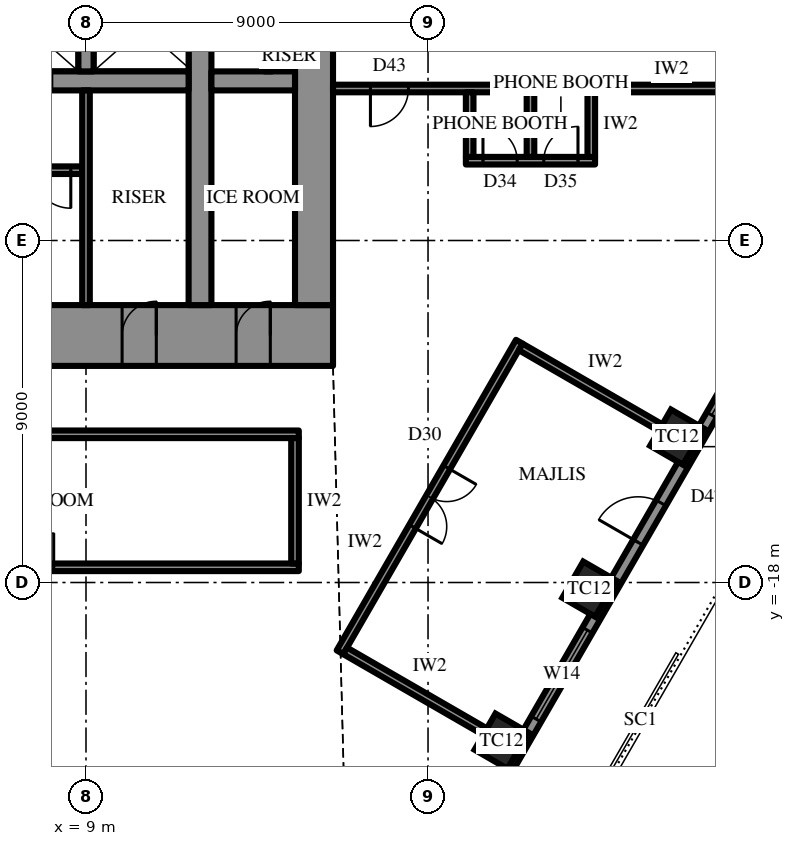
"""IFC4 building model, lengths in metres.
Left out: names, types, materials, properties, quantities, classifications, styles, units other than length and angle.
Written with IfcOpenShell. Run it as: python <this file> out.ifc"""

import sys

from ifc_helpers import new_model, si_unit, direction, frame, frame_2d, origin, origin_2d, place, context, subcontext, project, spatial, rectangle, extrude, element, fill, save


model = new_model("IFC4")
c1 = context("Model", 3, precision=1e-05, world=origin(), true_north=direction((0.0, 1.0)))
c2 = subcontext(c1, "Body", "Model", "MODEL_VIEW")
j1 = project(units=[si_unit("LENGTHUNIT", "METRE"), si_unit("PLANEANGLEUNIT", "RADIAN")], contexts=[c1])
p1 = place(None, origin())
s1 = spatial("IfcSite", under=j1, at=p1, CompositionType="ELEMENT")
p2 = place(p1, origin())
s2 = spatial("IfcBuilding", under=s1, at=p2, CompositionType="ELEMENT")
p3 = place(p2, frame((0.0, 0.0, 286.9)))
s3 = spatial("IfcBuildingStorey", under=s2, at=p3, CompositionType="ELEMENT", Elevation=286.9)
for number, where, z_axis, x_axis in (
    (1, (19.933, -22.175, 0.0), (0.0, 0.0, 1.0), (0.5, 0.866, 0.0)),
    (2, (22.242, -18.175, 0.0), (0.0, 0.0, 1.0), (0.5, 0.866, 0.0)),
    (3, (24.552, -14.175, 0.0), (0.0, 0.0, 1.0), (0.5, 0.866, 0.0)),
):
    element("IfcColumn", number, at=place(p3, frame(where, z_axis=z_axis, x_axis=x_axis)), inside=s3, PredefinedType="COLUMN", context=c2, shape_type="SweptSolid", body=[
        extrude(rectangle(XDim=1.1, YDim=1.0, at=origin_2d()), origin(), (0.0, 0.0, 1.0), 4.2),
    ])
p4 = place(p3, frame((15.5, -11.5, 0.0), z_axis=(0.0, 0.0, 1.0), x_axis=(-1.0, 0.0, 0.0)))
e4 = element("IfcWall", 4, at=p4, inside=s3, PredefinedType="SHEAR", context=c2, shape_type="SweptSolid", body=[
    extrude(rectangle(XDim=31.0, YDim=1.6, at=frame_2d((15.5, 0.0))), origin(), (0.0, 0.0, 1.0), 4.2),
])
p5 = place(p4, frame((16.35, 0.0, 0.0)))
e5 = element("IfcOpeningElement", 5, at=p5, cuts=e4, PredefinedType="OPENING", context=c2, shape_type="SweptSolid", body=[
    extrude(rectangle(XDim=0.9, YDim=2.2, at=frame_2d((0.45, 1.1))), frame((0.0, 0.81, 0.0), z_axis=(0.0, -1.0, 0.0), x_axis=(1.0, 0.0, 0.0)), (0.0, 0.0, 1.0), 1.62),
])
p6 = place(p4, frame((19.35, 0.0, 0.0)))
e6 = element("IfcOpeningElement", 6, at=p6, cuts=e4, PredefinedType="OPENING", context=c2, shape_type="SweptSolid", body=[
    extrude(rectangle(XDim=0.9, YDim=2.2, at=frame_2d((0.45, 1.1))), frame((0.0, 0.81, 0.0), z_axis=(0.0, -1.0, 0.0), x_axis=(1.0, 0.0, 0.0)), (0.0, 0.0, 1.0), 1.62),
])
p7 = place(p4, frame((22.4, 0.0, 0.0)))
e7 = element("IfcOpeningElement", 7, at=p7, cuts=e4, PredefinedType="OPENING", context=c2, shape_type="SweptSolid", body=[
    extrude(rectangle(XDim=1.0, YDim=2.2, at=frame_2d((0.5, 1.1))), frame((0.0, 0.81, 0.0), z_axis=(0.0, -1.0, 0.0), x_axis=(1.0, 0.0, 0.0)), (0.0, 0.0, 1.0), 1.62),
])
p8 = place(p4, frame((1.65, 0.0, 0.0)))
e8 = element("IfcOpeningElement", 8, at=p8, cuts=e4, PredefinedType="OPENING", context=c2, shape_type="SweptSolid", body=[
    extrude(rectangle(XDim=0.9, YDim=2.2, at=frame_2d((0.45, 1.1))), frame((0.0, 0.81, 0.0), z_axis=(0.0, -1.0, 0.0), x_axis=(1.0, 0.0, 0.0)), (0.0, 0.0, 1.0), 1.62),
])
p9 = place(p4, frame((4.65, 0.0, 0.0)))
e9 = element("IfcOpeningElement", 9, at=p9, cuts=e4, PredefinedType="OPENING", context=c2, shape_type="SweptSolid", body=[
    extrude(rectangle(XDim=0.9, YDim=2.2, at=frame_2d((0.45, 1.1))), frame((0.0, 0.81, 0.0), z_axis=(0.0, -1.0, 0.0), x_axis=(1.0, 0.0, 0.0)), (0.0, 0.0, 1.0), 1.62),
])
p10 = place(p4, frame((25.45, 0.0, 0.0)))
e10 = element("IfcOpeningElement", 10, at=p10, cuts=e4, PredefinedType="OPENING", context=c2, shape_type="SweptSolid", body=[
    extrude(rectangle(XDim=0.9, YDim=2.2, at=frame_2d((0.45, 1.1))), frame((0.0, 0.81, 0.0), z_axis=(0.0, -1.0, 0.0), x_axis=(1.0, 0.0, 0.0)), (0.0, 0.0, 1.0), 1.62),
])
p11 = place(p4, frame((28.45, 0.0, 0.0)))
e11 = element("IfcOpeningElement", 11, at=p11, cuts=e4, PredefinedType="OPENING", context=c2, shape_type="SweptSolid", body=[
    extrude(rectangle(XDim=0.9, YDim=2.2, at=frame_2d((0.45, 1.1))), frame((0.0, 0.81, 0.0), z_axis=(0.0, -1.0, 0.0), x_axis=(1.0, 0.0, 0.0)), (0.0, 0.0, 1.0), 1.62),
])
p12 = place(p3, frame((15.0, -10.7, 0.0), z_axis=(0.0, 0.0, 1.0), x_axis=(0.0, 1.0, 0.0)))
e12 = element("IfcWall", 12, at=p12, inside=s3, PredefinedType="SHEAR", context=c2, shape_type="SweptSolid", body=[
    extrude(rectangle(XDim=21.4, YDim=1.0, at=frame_2d((10.7, 0.0))), origin(), (0.0, 0.0, 1.0), 4.2),
])
p13 = place(p12, frame((9.8, 0.0, 0.0)))
e13 = element("IfcOpeningElement", 13, at=p13, cuts=e12, PredefinedType="OPENING", context=c2, shape_type="SweptSolid", body=[
    extrude(rectangle(XDim=1.8, YDim=2.4, at=frame_2d((0.9, 1.2))), frame((0.0, 0.51, 0.0), z_axis=(0.0, -1.0, 0.0), x_axis=(1.0, 0.0, 0.0)), (0.0, 0.0, 1.0), 1.02),
])
p14 = place(p3, frame((12.0, -10.7, 0.0), z_axis=(0.0, 0.0, 1.0), x_axis=(0.0, 1.0, 0.0)))
e14 = element("IfcWall", 14, at=p14, inside=s3, PredefinedType="SHEAR", context=c2, shape_type="SweptSolid", body=[
    extrude(rectangle(XDim=21.4, YDim=0.6, at=frame_2d((10.7, 0.0))), origin(), (0.0, 0.0, 1.0), 4.2),
])
p15 = place(p14, frame((9.8, 0.0, 0.0)))
e15 = element("IfcOpeningElement", 15, at=p15, cuts=e14, PredefinedType="OPENING", context=c2, shape_type="SweptSolid", body=[
    extrude(rectangle(XDim=1.8, YDim=2.4, at=frame_2d((0.9, 1.2))), frame((0.0, 0.31, 0.0), z_axis=(0.0, -1.0, 0.0), x_axis=(1.0, 0.0, 0.0)), (0.0, 0.0, 1.0), 0.62),
])
p16 = place(p3, frame((14.5, -4.8, 0.0), z_axis=(0.0, 0.0, 1.0), x_axis=(-1.0, 0.0, 0.0)))
e16 = element("IfcWall", 16, at=p16, inside=s3, PredefinedType="SHEAR", context=c2, shape_type="SweptSolid", body=[
    extrude(rectangle(XDim=2.2, YDim=0.5, at=frame_2d((1.1, 0.0))), origin(), (0.0, 0.0, 1.0), 4.2),
])
p17 = place(p3, frame((11.7, -4.8, 0.0), z_axis=(0.0, 0.0, 1.0), x_axis=(-1.0, 0.0, 0.0)))
e17 = element("IfcWall", 17, at=p17, inside=s3, PredefinedType="SHEAR", context=c2, shape_type="SweptSolid", body=[
    extrude(rectangle(XDim=23.4, YDim=0.5, at=frame_2d((11.7, 0.0))), origin(), (0.0, 0.0, 1.0), 4.2),
])
p18 = place(p17, frame((6.6, 0.0, 0.0)))
e18 = element("IfcOpeningElement", 18, at=p18, cuts=e17, PredefinedType="OPENING", context=c2, shape_type="SweptSolid", body=[
    extrude(rectangle(XDim=1.2, YDim=2.2, at=frame_2d((0.6, 1.1))), frame((0.0, 0.26, 0.0), z_axis=(0.0, -1.0, 0.0), x_axis=(1.0, 0.0, 0.0)), (0.0, 0.0, 1.0), 0.52),
])
p19 = place(p17, frame((3.6, 0.0, 0.0)))
e19 = element("IfcOpeningElement", 19, at=p19, cuts=e17, PredefinedType="OPENING", context=c2, shape_type="SweptSolid", body=[
    extrude(rectangle(XDim=1.2, YDim=2.2, at=frame_2d((0.6, 1.1))), frame((0.0, 0.26, 0.0), z_axis=(0.0, -1.0, 0.0), x_axis=(1.0, 0.0, 0.0)), (0.0, 0.0, 1.0), 0.52),
])
p20 = place(p3, frame((9.0, -2.25, 0.0), z_axis=(0.0, 0.0, 1.0), x_axis=(0.0, -1.0, 0.0)))
e20 = element("IfcWall", 20, at=p20, inside=s3, PredefinedType="SHEAR", context=c2, shape_type="SweptSolid", body=[
    extrude(rectangle(XDim=2.3, YDim=0.4, at=frame_2d((1.15, 0.0))), origin(), (0.0, 0.0, 1.0), 4.2),
])
p21 = place(p3, frame((8.9, -7.15, 0.0), z_axis=(0.0, 0.0, 1.0), x_axis=(-1.0, 0.0, 0.0)))
e21 = element("IfcWall", 21, at=p21, inside=s3, PredefinedType="SHEAR", context=c2, shape_type="SweptSolid", body=[
    extrude(rectangle(XDim=8.6, YDim=0.2, at=frame_2d((4.3, 0.0))), origin(), (0.0, 0.0, 1.0), 4.2),
])
p22 = place(p21, frame((0.3, 0.0, 0.0)))
e22 = element("IfcOpeningElement", 22, at=p22, cuts=e21, PredefinedType="OPENING", context=c2, shape_type="SweptSolid", body=[
    extrude(rectangle(XDim=1.0, YDim=2.2, at=frame_2d((0.5, 1.1))), frame((0.0, 0.11, 0.0), z_axis=(0.0, -1.0, 0.0), x_axis=(1.0, 0.0, 0.0)), (0.0, 0.0, 1.0), 0.22),
])
p23 = place(p3, frame((18.707, -25.299, 0.0), z_axis=(0.0, 0.0, 1.0), x_axis=(0.500000442367, 0.866025148383, 0.0)))
e23 = element("IfcWall", 23, at=p23, inside=s3, PredefinedType="SOLIDWALL", context=c2, shape_type="SweptSolid", body=[
    extrude(rectangle(XDim=25.113, YDim=0.3, at=frame_2d((12.556, 0.0))), origin(), (0.0, 0.0, 1.0), 2.8),
])
p24 = place(p23, frame((4.278, 0.0, 0.6)))
e24 = element("IfcOpeningElement", 24, at=p24, cuts=e23, PredefinedType="OPENING", context=c2, shape_type="SweptSolid", body=[
    extrude(rectangle(XDim=2.7, YDim=1.95, at=frame_2d((1.35, 0.975))), frame((0.0, 0.16, 0.0), z_axis=(0.0, -1.0, 0.0), x_axis=(1.0, 0.0, 0.0)), (0.0, 0.0, 1.0), 0.32),
])
p25 = place(p23, frame((9.647, 0.0, 0.0)))
e25 = element("IfcOpeningElement", 25, at=p25, cuts=e23, PredefinedType="OPENING", context=c2, shape_type="SweptSolid", body=[
    extrude(rectangle(XDim=1.2, YDim=2.4, at=frame_2d((0.6, 1.2))), frame((0.0, 0.16, 0.0), z_axis=(0.0, -1.0, 0.0), x_axis=(1.0, 0.0, 0.0)), (0.0, 0.0, 1.0), 0.32),
])
p26 = place(p23, frame((13.516, 0.0, 0.6)))
e26 = element("IfcOpeningElement", 26, at=p26, cuts=e23, PredefinedType="OPENING", context=c2, shape_type="SweptSolid", body=[
    extrude(rectangle(XDim=2.7, YDim=1.95, at=frame_2d((1.35, 0.975))), frame((0.0, 0.16, 0.0), z_axis=(0.0, -1.0, 0.0), x_axis=(1.0, 0.0, 0.0)), (0.0, 0.0, 1.0), 0.32),
])
p27 = place(p23, frame((18.135, 0.0, 0.6)))
e27 = element("IfcOpeningElement", 27, at=p27, cuts=e23, PredefinedType="OPENING", context=c2, shape_type="SweptSolid", body=[
    extrude(rectangle(XDim=2.7, YDim=1.95, at=frame_2d((1.35, 0.975))), frame((0.0, 0.16, 0.0), z_axis=(0.0, -1.0, 0.0), x_axis=(1.0, 0.0, 0.0)), (0.0, 0.0, 1.0), 0.32),
])
p28 = place(p3, frame((9.0, -5.05, 0.0), z_axis=(0.0, 0.0, 1.0), x_axis=(0.0, -1.0, 0.0)))
e28 = element("IfcWall", 28, at=p28, inside=s3, PredefinedType="PARTITIONING", context=c2, shape_type="SweptSolid", body=[
    extrude(rectangle(XDim=5.65, YDim=0.2, at=frame_2d((2.825, 0.0))), origin(), (0.0, 0.0, 1.0), 4.0),
])
p29 = place(p3, frame((13.8, -3.55, 0.0), z_axis=(0.0, 0.0, 1.0), x_axis=(0.0, -1.0, 0.0)))
e29 = element("IfcWall", 29, at=p29, inside=s3, PredefinedType="PARTITIONING", context=c2, shape_type="SweptSolid", body=[
    extrude(rectangle(XDim=1.0, YDim=0.2, at=frame_2d((0.5, 0.0))), origin(), (0.0, 0.0, 1.0), 4.0),
])
p30 = place(p3, frame((14.6, -14.1, 0.0), z_axis=(0.0, 0.0, 1.0), x_axis=(-1.0, 0.0, 0.0)))
e30 = element("IfcWall", 30, at=p30, inside=s3, PredefinedType="PARTITIONING", context=c2, shape_type="SweptSolid", body=[
    extrude(rectangle(XDim=29.2, YDim=0.2, at=frame_2d((14.6, 0.0))), origin(), (0.0, 0.0, 1.0), 4.0),
])
p31 = place(p3, frame((14.6, -17.6, 0.0), z_axis=(0.0, 0.0, 1.0), x_axis=(-1.0, 0.0, 0.0)))
e31 = element("IfcWall", 31, at=p31, inside=s3, PredefinedType="PARTITIONING", context=c2, shape_type="SweptSolid", body=[
    extrude(rectangle(XDim=29.2, YDim=0.2, at=frame_2d((14.6, 0.0))), origin(), (0.0, 0.0, 1.0), 4.0),
])
p32 = place(p31, frame((6.45, 0.0, 0.0)))
e32 = element("IfcOpeningElement", 32, at=p32, cuts=e31, PredefinedType="OPENING", context=c2, shape_type="SweptSolid", body=[
    extrude(rectangle(XDim=1.8, YDim=2.4, at=frame_2d((0.9, 1.2))), frame((0.0, 0.11, 0.0), z_axis=(0.0, -1.0, 0.0), x_axis=(1.0, 0.0, 0.0)), (0.0, 0.0, 1.0), 0.22),
])
p33 = place(p31, frame((20.95, 0.0, 0.0)))
e33 = element("IfcOpeningElement", 33, at=p33, cuts=e31, PredefinedType="OPENING", context=c2, shape_type="SweptSolid", body=[
    extrude(rectangle(XDim=1.8, YDim=2.4, at=frame_2d((0.9, 1.2))), frame((0.0, 0.11, 0.0), z_axis=(0.0, -1.0, 0.0), x_axis=(1.0, 0.0, 0.0)), (0.0, 0.0, 1.0), 0.22),
])
p34 = place(p3, frame((14.5, -14.2, 0.0), z_axis=(0.0, 0.0, 1.0), x_axis=(0.0, -1.0, 0.0)))
e34 = element("IfcWall", 34, at=p34, inside=s3, PredefinedType="PARTITIONING", context=c2, shape_type="SweptSolid", body=[
    extrude(rectangle(XDim=3.3, YDim=0.2, at=frame_2d((1.65, 0.0))), origin(), (0.0, 0.0, 1.0), 4.0),
])
p35 = place(p3, frame((15.683, -19.837, 0.0), z_axis=(0.0, 0.0, 1.0), x_axis=(0.499989672313, 0.866031366395, 0.0)))
e35 = element("IfcWall", 35, at=p35, inside=s3, PredefinedType="PARTITIONING", context=c2, shape_type="SweptSolid", body=[
    extrude(rectangle(XDim=9.438, YDim=0.2, at=frame_2d((4.719, 0.0))), origin(), (0.0, 0.0, 1.0), 4.0),
])
p36 = place(p35, frame((3.819, 0.0, 0.0)))
e36 = element("IfcOpeningElement", 36, at=p36, cuts=e35, PredefinedType="OPENING", context=c2, shape_type="SweptSolid", body=[
    extrude(rectangle(XDim=1.8, YDim=2.4, at=frame_2d((0.9, 1.2))), frame((0.0, 0.11, 0.0), z_axis=(0.0, -1.0, 0.0), x_axis=(1.0, 0.0, 0.0)), (0.0, 0.0, 1.0), 0.22),
])
for number, where, z_axis, x_axis in (
    (37, (15.819, -19.8, 0.0), (0.0, 0.0, 1.0), (0.866, -0.5, 0.0)),
    (38, (20.438, -11.8, 0.0), (0.0, 0.0, 1.0), (0.866, -0.5, 0.0)),
):
    element("IfcWall", number, at=place(p3, frame(where, z_axis=z_axis, x_axis=x_axis)), inside=s3, PredefinedType="PARTITIONING", context=c2, shape_type="SweptSolid", body=[
        extrude(rectangle(XDim=4.25, YDim=0.2, at=frame_2d((2.125, 0.0))), origin(), (0.0, 0.0, 1.0), 3.082),
    ])
p37 = place(p3, frame((15.5, -5.0, 0.0), z_axis=(0.0, 0.0, 1.0), x_axis=(1.0, 0.0, 0.0)))
e39 = element("IfcWall", 39, at=p37, inside=s3, PredefinedType="PARTITIONING", context=c2, shape_type="SweptSolid", body=[
    extrude(rectangle(XDim=14.845, YDim=0.2, at=frame_2d((7.423, 0.0))), origin(), (0.0, 0.0, 1.0), 4.0),
])
p38 = place(p37, frame((0.985, 0.0, 0.0)))
e40 = element("IfcOpeningElement", 40, at=p38, cuts=e39, PredefinedType="OPENING", context=c2, shape_type="SweptSolid", body=[
    extrude(rectangle(XDim=1.0, YDim=2.2, at=frame_2d((0.5, 1.1))), frame((0.0, 0.11, 0.0), z_axis=(0.0, -1.0, 0.0), x_axis=(1.0, 0.0, 0.0)), (0.0, 0.0, 1.0), 0.22),
])
p39 = place(p3, frame((18.996, -6.9, 0.0), z_axis=(0.0, 0.0, 1.0), x_axis=(1.0, 0.0, 0.0)))
e41 = element("IfcWall", 41, at=p39, inside=s3, PredefinedType="PARTITIONING", context=c2, shape_type="SweptSolid", body=[
    extrude(rectangle(XDim=3.4, YDim=0.2, at=frame_2d((1.7, 0.0))), origin(), (0.0, 0.0, 1.0), 4.0),
])
p40 = place(p39, frame((0.45, 0.0, 0.0)))
e42 = element("IfcOpeningElement", 42, at=p40, cuts=e41, PredefinedType="OPENING", context=c2, shape_type="SweptSolid", body=[
    extrude(rectangle(XDim=0.9, YDim=2.2, at=frame_2d((0.45, 1.1))), frame((0.0, 0.11, 0.0), z_axis=(0.0, -1.0, 0.0), x_axis=(1.0, 0.0, 0.0)), (0.0, 0.0, 1.0), 0.22),
])
p41 = place(p39, frame((2.05, 0.0, 0.0)))
e43 = element("IfcOpeningElement", 43, at=p41, cuts=e41, PredefinedType="OPENING", context=c2, shape_type="SweptSolid", body=[
    extrude(rectangle(XDim=0.9, YDim=2.2, at=frame_2d((0.45, 1.1))), frame((0.0, 0.11, 0.0), z_axis=(0.0, -1.0, 0.0), x_axis=(1.0, 0.0, 0.0)), (0.0, 0.0, 1.0), 0.22),
])
for number, where, z_axis, x_axis in (
    (44, (19.096, -5.1, 0.0), (0.0, 0.0, 1.0), (0.0, -1.0, 0.0)),
    (45, (20.696, -5.1, 0.0), (0.0, 0.0, 1.0), (0.0, -1.0, 0.0)),
    (46, (22.296, -5.1, 0.0), (0.0, 0.0, 1.0), (0.0, -1.0, 0.0)),
):
    element("IfcWall", number, at=place(p3, frame(where, z_axis=z_axis, x_axis=x_axis)), inside=s3, PredefinedType="PARTITIONING", context=c2, shape_type="SweptSolid", body=[
        extrude(rectangle(XDim=1.7, YDim=0.2, at=frame_2d((0.85, 0.0))), origin(), (0.0, 0.0, 1.0), 4.0),
    ])
p42 = place(p24, origin())
e47 = element("IfcWindow", 47, at=p42, inside=s3, PartitioningType="SINGLE_PANEL", PredefinedType="WINDOW", context=c2, shape_type="SweptSolid", body=[
    extrude(rectangle(XDim=2.7, YDim=1.95, at=frame_2d((1.35, 0.975))), frame((0.0, 0.03, 0.0), z_axis=(0.0, -1.0, 0.0), x_axis=(1.0, 0.0, 0.0)), (0.0, 0.0, 1.0), 0.06),
])
fill(e24, e47)
p43 = place(p25, origin())
e48 = element("IfcDoor", 48, at=p43, inside=s3, OperationType="SINGLE_SWING_RIGHT", PredefinedType="DOOR", context=c2, shape_type="SweptSolid", body=[
    extrude(rectangle(XDim=1.2, YDim=2.4, at=frame_2d((0.6, 1.2))), frame((0.0, 0.025, 0.0), z_axis=(0.0, -1.0, 0.0), x_axis=(1.0, 0.0, 0.0)), (0.0, 0.0, 1.0), 0.05),
])
fill(e25, e48)
p44 = place(p26, origin())
e49 = element("IfcWindow", 49, at=p44, inside=s3, PartitioningType="SINGLE_PANEL", PredefinedType="WINDOW", context=c2, shape_type="SweptSolid", body=[
    extrude(rectangle(XDim=2.7, YDim=1.95, at=frame_2d((1.35, 0.975))), frame((0.0, 0.03, 0.0), z_axis=(0.0, -1.0, 0.0), x_axis=(1.0, 0.0, 0.0)), (0.0, 0.0, 1.0), 0.06),
])
fill(e26, e49)
p45 = place(p22, origin())
e50 = element("IfcDoor", 50, at=p45, inside=s3, OperationType="SINGLE_SWING_RIGHT", PredefinedType="DOOR", context=c2, shape_type="SweptSolid", body=[
    extrude(rectangle(XDim=1.0, YDim=2.2, at=frame_2d((0.5, 1.1))), frame((0.0, 0.025, 0.0), z_axis=(0.0, -1.0, 0.0), x_axis=(1.0, 0.0, 0.0)), (0.0, 0.0, 1.0), 0.05),
])
fill(e22, e50)
p46 = place(p8, frame((0.9, 0.0, 0.0), z_axis=(0.0, 0.0, 1.0), x_axis=(-1.0, 0.0, 0.0)))
e51 = element("IfcDoor", 51, at=p46, inside=s3, OperationType="SINGLE_SWING_LEFT", PredefinedType="DOOR", context=c2, shape_type="SweptSolid", body=[
    extrude(rectangle(XDim=0.9, YDim=2.2, at=frame_2d((0.45, 1.1))), frame((0.0, 0.025, 0.0), z_axis=(0.0, -1.0, 0.0), x_axis=(1.0, 0.0, 0.0)), (0.0, 0.0, 1.0), 0.05),
])
fill(e8, e51)
p47 = place(p9, frame((0.9, 0.0, 0.0), z_axis=(0.0, 0.0, 1.0), x_axis=(-1.0, 0.0, 0.0)))
e52 = element("IfcDoor", 52, at=p47, inside=s3, OperationType="SINGLE_SWING_LEFT", PredefinedType="DOOR", context=c2, shape_type="SweptSolid", body=[
    extrude(rectangle(XDim=0.9, YDim=2.2, at=frame_2d((0.45, 1.1))), frame((0.0, 0.025, 0.0), z_axis=(0.0, -1.0, 0.0), x_axis=(1.0, 0.0, 0.0)), (0.0, 0.0, 1.0), 0.05),
])
fill(e9, e52)
p48 = place(p32, frame((1.8, 0.0, 0.0), z_axis=(0.0, 0.0, 1.0), x_axis=(-1.0, 0.0, 0.0)))
e53 = element("IfcDoor", 53, at=p48, inside=s3, OperationType="DOUBLE_DOOR_SINGLE_SWING", PredefinedType="DOOR", context=c2, shape_type="SweptSolid", body=[
    extrude(rectangle(XDim=1.8, YDim=2.4, at=frame_2d((0.9, 1.2))), frame((0.0, 0.025, 0.0), z_axis=(0.0, -1.0, 0.0), x_axis=(1.0, 0.0, 0.0)), (0.0, 0.0, 1.0), 0.05),
])
fill(e32, e53)
p49 = place(p36, frame((1.8, 0.0, 0.0), z_axis=(0.0, 0.0, 1.0), x_axis=(-1.0, 0.0, 0.0)))
e54 = element("IfcDoor", 54, at=p49, inside=s3, OperationType="DOUBLE_DOOR_SINGLE_SWING", PredefinedType="DOOR", context=c2, shape_type="SweptSolid", body=[
    extrude(rectangle(XDim=1.8, YDim=2.4, at=frame_2d((0.9, 1.2))), frame((0.0, 0.025, 0.0), z_axis=(0.0, -1.0, 0.0), x_axis=(1.0, 0.0, 0.0)), (0.0, 0.0, 1.0), 0.05),
])
fill(e36, e54)
p50 = place(p38, frame((1.0, 0.0, 0.0), z_axis=(0.0, 0.0, 1.0), x_axis=(-1.0, 0.0, 0.0)))
e55 = element("IfcDoor", 55, at=p50, inside=s3, OperationType="SINGLE_SWING_LEFT", PredefinedType="DOOR", context=c2, shape_type="SweptSolid", body=[
    extrude(rectangle(XDim=1.0, YDim=2.2, at=frame_2d((0.5, 1.1))), frame((0.0, 0.025, 0.0), z_axis=(0.0, -1.0, 0.0), x_axis=(1.0, 0.0, 0.0)), (0.0, 0.0, 1.0), 0.05),
])
fill(e40, e55)
p51 = place(p40, origin())
e56 = element("IfcDoor", 56, at=p51, inside=s3, OperationType="SINGLE_SWING_RIGHT", PredefinedType="DOOR", context=c2, shape_type="SweptSolid", body=[
    extrude(rectangle(XDim=0.9, YDim=2.2, at=frame_2d((0.45, 1.1))), frame((0.0, 0.025, 0.0), z_axis=(0.0, -1.0, 0.0), x_axis=(1.0, 0.0, 0.0)), (0.0, 0.0, 1.0), 0.05),
])
fill(e42, e56)
p52 = place(p41, origin())
e57 = element("IfcDoor", 57, at=p52, inside=s3, OperationType="SINGLE_SWING_LEFT", PredefinedType="DOOR", context=c2, shape_type="SweptSolid", body=[
    extrude(rectangle(XDim=0.9, YDim=2.2, at=frame_2d((0.45, 1.1))), frame((0.0, 0.025, 0.0), z_axis=(0.0, -1.0, 0.0), x_axis=(1.0, 0.0, 0.0)), (0.0, 0.0, 1.0), 0.05),
])
fill(e43, e57)
save(model, sys.argv[1])
